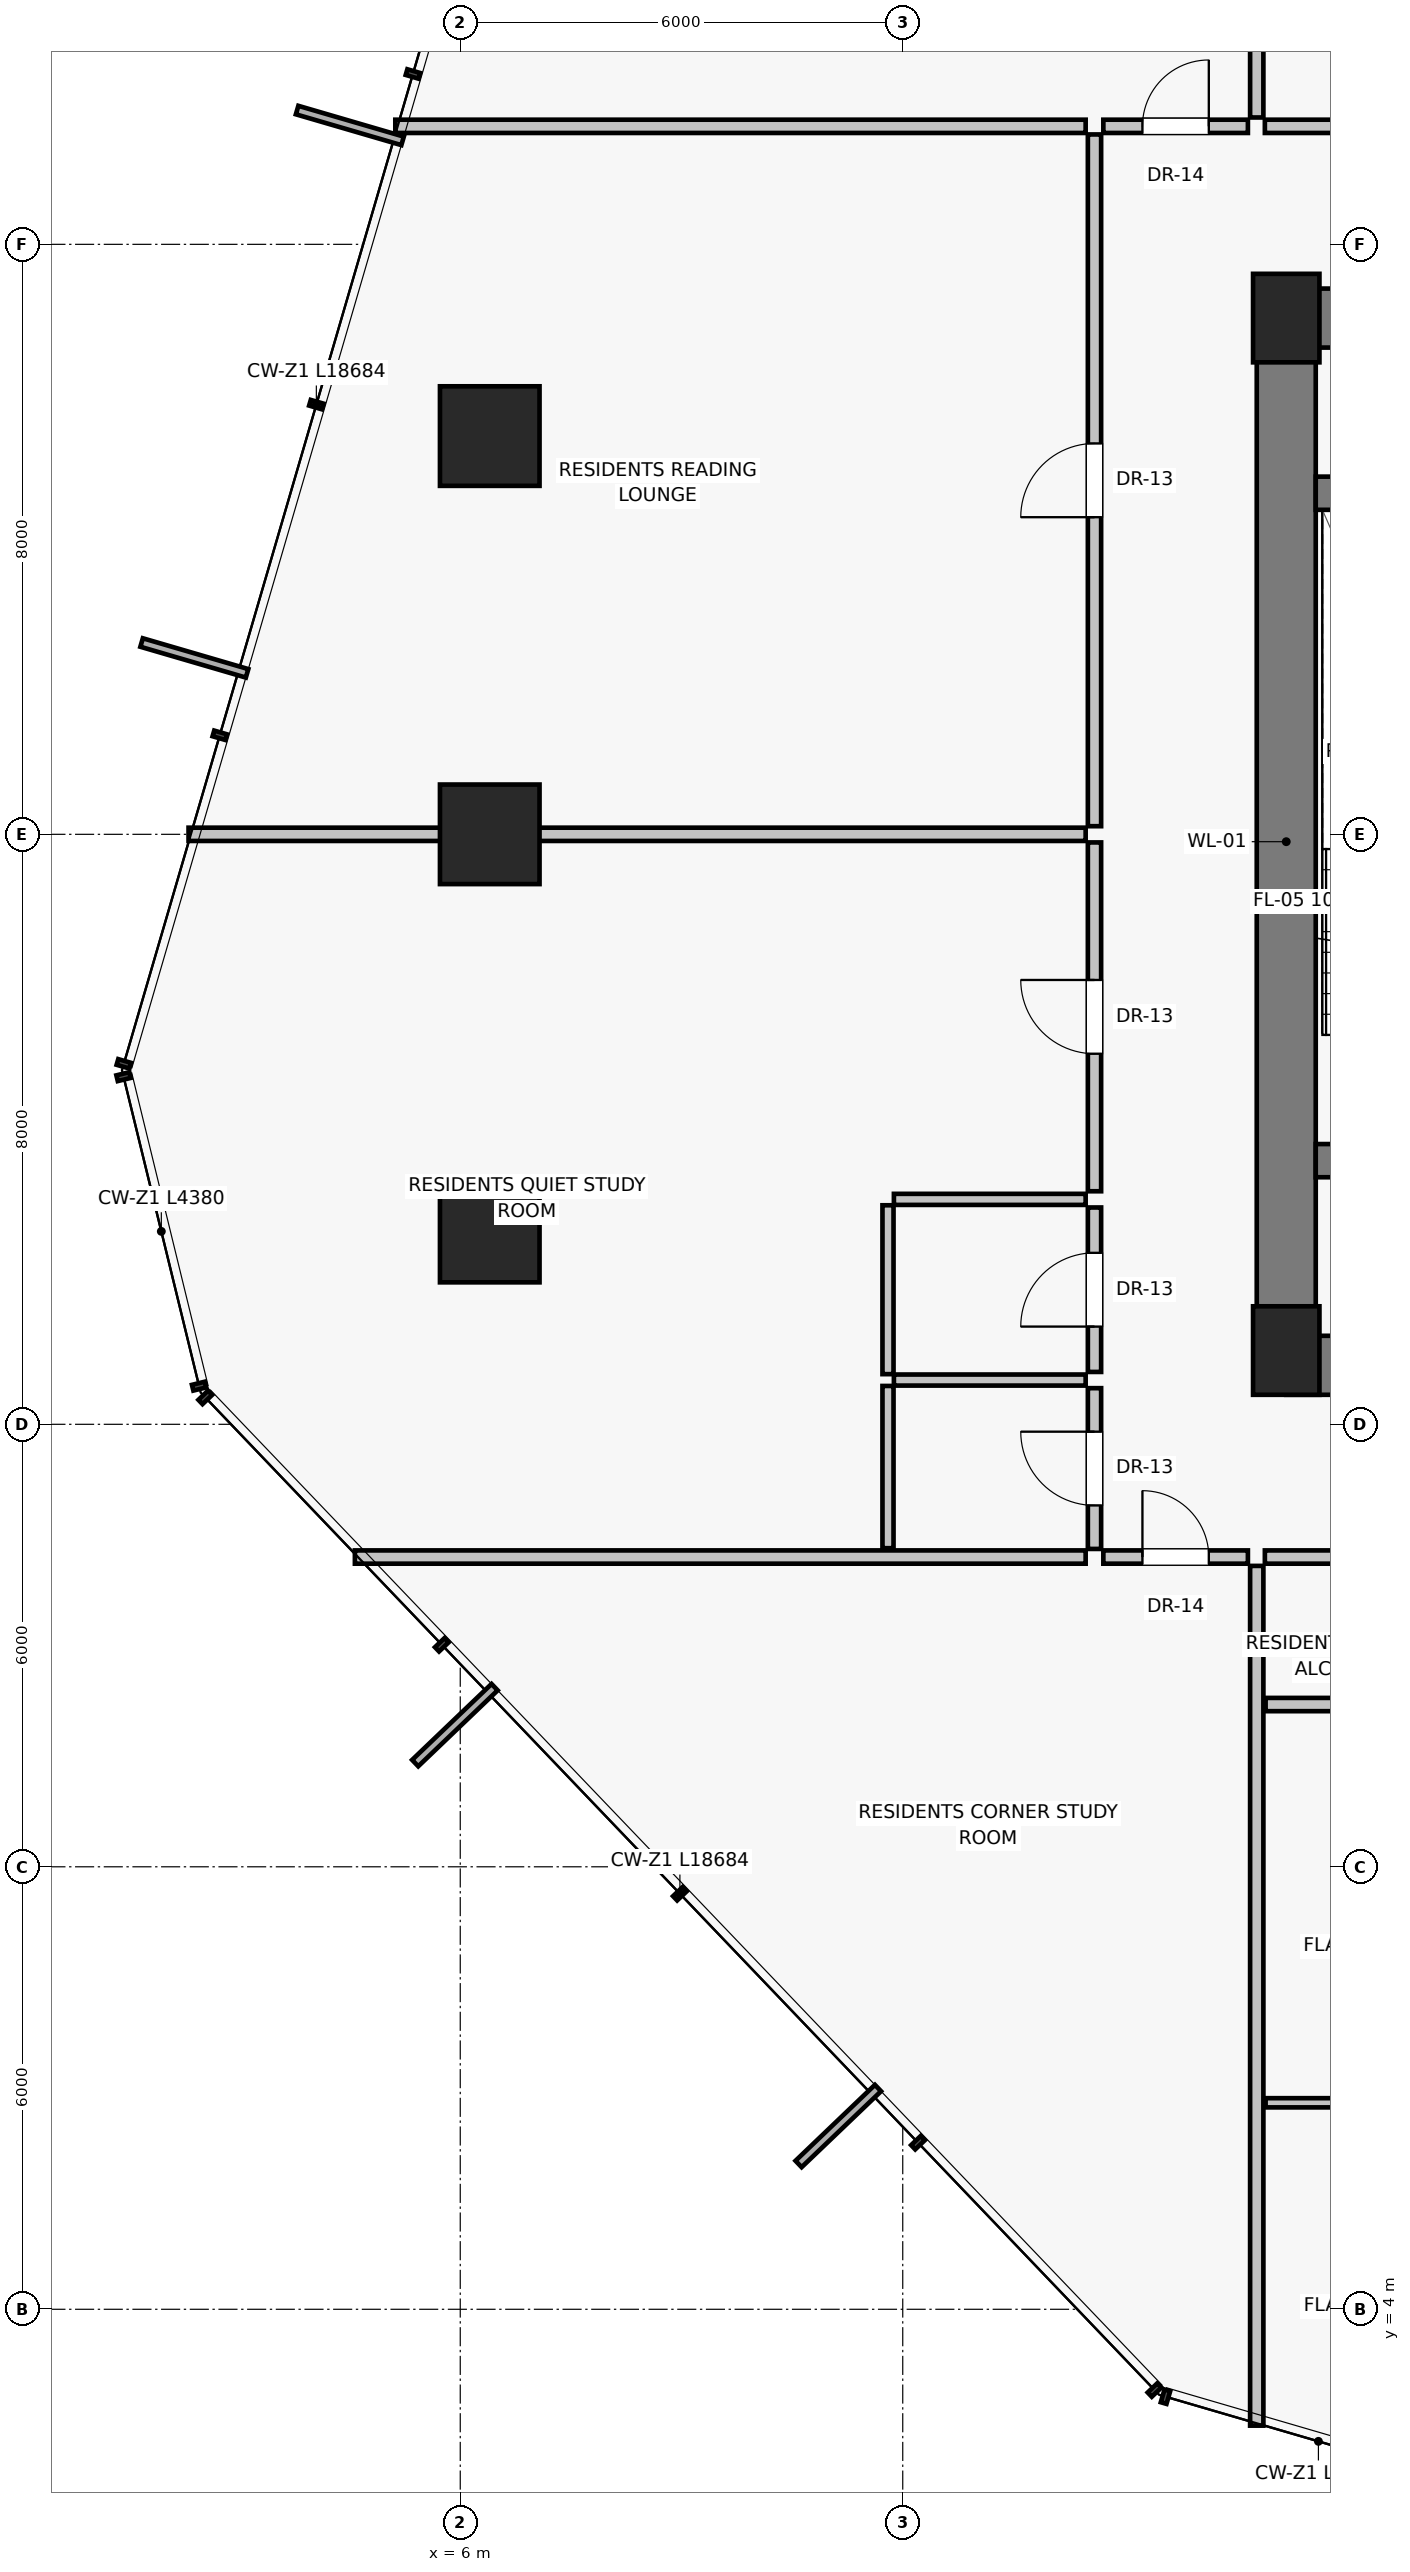
"""IFC4 building model, lengths in metres.
Left out: names, types, materials, properties, quantities, classifications, styles, units other than length and angle.
Written with IfcOpenShell. Run it as: python <this file> out.ifc"""

import sys

from ifc_helpers import new_model, si_unit, direction, frame, frame_2d, origin, origin_2d, place, context, subcontext, project, spatial, rectangle, extrude, source, transform, mapped, element, fill, save


model = new_model("IFC4")
c1 = context("Model", 3, precision=1e-05, world=origin(), true_north=direction((0.0, 1.0)))
c2 = subcontext(c1, "Body", "Model", "MODEL_VIEW")
j1 = project(units=[si_unit("LENGTHUNIT", "METRE"), si_unit("PLANEANGLEUNIT", "RADIAN")], contexts=[c1])
p1 = place(None, origin())
s1 = spatial("IfcSite", under=j1, at=p1, CompositionType="ELEMENT")
p2 = place(p1, origin())
s2 = spatial("IfcBuilding", under=s1, at=p2, CompositionType="ELEMENT")
p3 = place(p2, frame((0.0, 0.0, 70.6)))
s3 = spatial("IfcBuildingStorey", under=s2, at=p3, CompositionType="ELEMENT", Elevation=70.6)
for number, where, z_axis, x_axis in (
    (1, (17.2, 17.0, 0.0), (0.0, 0.0, 1.0), (1.0, 0.0, 0.0)),
    (2, (17.2, 31.0, 0.0), (0.0, 0.0, 1.0), (1.0, 0.0, 0.0)),
):
    element("IfcColumn", number, at=place(p3, frame(where, z_axis=z_axis, x_axis=x_axis)), inside=s3, PredefinedType="PILASTER", context=c2, shape_type="SweptSolid", body=[
        extrude(rectangle(XDim=0.9, YDim=1.2, at=origin_2d()), origin(), (0.0, 0.0, 1.0), 3.25),
    ])
for number, where, z_axis, x_axis in (
    (3, (6.4, 29.4, 0.0), (0.0, 0.0, 1.0), (1.0, 0.0, 0.0)),
    (4, (6.4, 24.0, 0.0), (0.0, 0.0, 1.0), (1.0, 0.0, 0.0)),
    (5, (6.4, 18.6, 0.0), (0.0, 0.0, 1.0), (1.0, 0.0, 0.0)),
):
    element("IfcColumn", number, at=place(p3, frame(where, z_axis=z_axis, x_axis=x_axis)), inside=s3, PredefinedType="COLUMN", context=c2, shape_type="SweptSolid", body=[
        extrude(rectangle(XDim=1.35, YDim=1.35, at=origin_2d()), origin(), (0.0, 0.0, 1.0), 3.25),
    ])
p4 = place(p3, frame((17.2, 16.8, 0.0), z_axis=(0.0, 0.0, 1.0), x_axis=(0.0, 1.0, 0.0)))
e6 = element("IfcWall", 6, at=p4, inside=s3, PredefinedType="SHEAR", context=c2, shape_type="SweptSolid", body=[
    extrude(rectangle(XDim=14.2, YDim=0.8, at=frame_2d((7.1, 0.0))), origin(), (0.0, 0.0, 1.0), 3.0),
])
p5 = place(p3, frame((17.2, 16.8, 0.0), z_axis=(0.0, 0.0, 1.0), x_axis=(1.0, 0.0, 0.0)))
e7 = element("IfcWall", 7, at=p5, inside=s3, PredefinedType="SHEAR", context=c2, shape_type="SweptSolid", body=[
    extrude(rectangle(XDim=5.85, YDim=0.8, at=frame_2d((2.925, 0.0))), origin(), (0.0, 0.0, 1.0), 3.0),
])
p6 = place(p5, frame((1.15, 0.0, 0.0)))
e8 = element("IfcOpeningElement", 8, at=p6, cuts=e7, PredefinedType="OPENING", context=c2, shape_type="SweptSolid", body=[
    extrude(rectangle(XDim=1.2, YDim=2.03, at=frame_2d((0.6, 1.015))), frame((0.0, 0.41, 0.0), z_axis=(0.0, -1.0, 0.0), x_axis=(1.0, 0.0, 0.0)), (0.0, 0.0, 1.0), 0.82),
])
p7 = place(p3, frame((17.2, 31.0, 0.0), z_axis=(0.0, 0.0, 1.0), x_axis=(1.0, 0.0, 0.0)))
e9 = element("IfcWall", 9, at=p7, inside=s3, PredefinedType="SHEAR", context=c2, shape_type="SweptSolid", body=[
    extrude(rectangle(XDim=3.8, YDim=0.8, at=frame_2d((1.9, 0.0))), origin(), (0.0, 0.0, 1.0), 3.0),
])
p8 = place(p7, frame((1.25, 0.0, 0.0)))
e10 = element("IfcOpeningElement", 10, at=p8, cuts=e9, PredefinedType="OPENING", context=c2, shape_type="SweptSolid", body=[
    extrude(rectangle(XDim=0.86, YDim=2.01, at=frame_2d((0.43, 1.005))), frame((0.0, 0.41, 0.0), z_axis=(0.0, -1.0, 0.0), x_axis=(1.0, 0.0, 0.0)), (0.0, 0.0, 1.0), 0.82),
])
p9 = place(p3, frame((17.6, 19.575, 0.0), z_axis=(0.0, 0.0, 1.0), x_axis=(1.0, 0.0, 0.0)))
e11 = element("IfcWall", 11, at=p9, inside=s3, PredefinedType="SHEAR", context=c2, shape_type="SweptSolid", body=[
    extrude(rectangle(XDim=3.425, YDim=0.45, at=frame_2d((1.712, 0.0))), origin(), (0.0, 0.0, 1.0), 3.0),
])
p10 = place(p9, frame((1.05, 0.0, 0.0)))
e12 = element("IfcOpeningElement", 12, at=p10, cuts=e11, PredefinedType="OPENING", context=c2, shape_type="SweptSolid", body=[
    extrude(rectangle(XDim=1.1, YDim=2.03, at=frame_2d((0.55, 1.015))), frame((0.0, 0.235, 0.0), z_axis=(0.0, -1.0, 0.0), x_axis=(1.0, 0.0, 0.0)), (0.0, 0.0, 1.0), 0.47),
])
p11 = place(p3, frame((17.6, 28.625, 0.0), z_axis=(0.0, 0.0, 1.0), x_axis=(1.0, 0.0, 0.0)))
e13 = element("IfcWall", 13, at=p11, inside=s3, PredefinedType="SHEAR", context=c2, shape_type="SweptSolid", body=[
    extrude(rectangle(XDim=3.425, YDim=0.45, at=frame_2d((1.712, 0.0))), origin(), (0.0, 0.0, 1.0), 3.0),
])
p12 = place(p3, frame((16.8, 14.08, 0.0), z_axis=(0.0, 0.0, 1.0), x_axis=(0.0, -1.0, 0.0)))
e14 = element("IfcWall", 14, at=p12, inside=s3, PredefinedType="PARTITIONING", context=c2, shape_type="SweptSolid", body=[
    extrude(rectangle(XDim=11.658, YDim=0.18, at=frame_2d((5.829, 0.0))), origin(), (0.0, 0.0, 1.0), 3.0),
])
p13 = place(p3, frame((16.91, 14.2, 0.0), z_axis=(0.0, 0.0, 1.0), x_axis=(1.0, 0.0, 0.0)))
e15 = element("IfcWall", 15, at=p13, inside=s3, PredefinedType="PARTITIONING", context=c2, shape_type="SweptSolid", body=[
    extrude(rectangle(XDim=4.1, YDim=0.18, at=frame_2d((2.05, 0.0))), origin(), (0.0, 0.0, 1.0), 3.0),
])
p14 = place(p13, frame((1.55, 0.0, 0.0)))
e16 = element("IfcOpeningElement", 16, at=p14, cuts=e15, PredefinedType="OPENING", context=c2, shape_type="SweptSolid", body=[
    extrude(rectangle(XDim=1.0, YDim=2.01, at=frame_2d((0.5, 1.005))), frame((0.0, 0.1, 0.0), z_axis=(0.0, -1.0, 0.0), x_axis=(1.0, 0.0, 0.0)), (0.0, 0.0, 1.0), 0.2),
])
p15 = place(p3, frame((16.92, 6.8, 0.0), z_axis=(0.0, 0.0, 1.0), x_axis=(1.0, 0.0, 0.0)))
e17 = element("IfcWall", 17, at=p15, inside=s3, PredefinedType="PARTITIONING", context=c2, shape_type="SweptSolid", body=[
    extrude(rectangle(XDim=4.1, YDim=0.125, at=frame_2d((2.05, 0.0))), origin(), (0.0, 0.0, 1.0), 2.1),
])
p16 = place(p3, frame((16.92, 12.2, 0.0), z_axis=(0.0, 0.0, 1.0), x_axis=(1.0, 0.0, 0.0)))
e18 = element("IfcWall", 18, at=p16, inside=s3, PredefinedType="PARTITIONING", context=c2, shape_type="SweptSolid", body=[
    extrude(rectangle(XDim=4.1, YDim=0.18, at=frame_2d((2.05, 0.0))), origin(), (0.0, 0.0, 1.0), 3.0),
])
p17 = place(p3, frame((16.8, 33.72, 0.0), z_axis=(0.0, 0.0, 1.0), x_axis=(0.0, 1.0, 0.0)))
e19 = element("IfcWall", 19, at=p17, inside=s3, PredefinedType="PARTITIONING", context=c2, shape_type="SweptSolid", body=[
    extrude(rectangle(XDim=9.948, YDim=0.18, at=frame_2d((4.974, 0.0))), origin(), (0.0, 0.0, 1.0), 3.0),
])
p18 = place(p3, frame((16.91, 33.6, 0.0), z_axis=(0.0, 0.0, 1.0), x_axis=(1.0, 0.0, 0.0)))
e20 = element("IfcWall", 20, at=p18, inside=s3, PredefinedType="PARTITIONING", context=c2, shape_type="SweptSolid", body=[
    extrude(rectangle(XDim=4.1, YDim=0.18, at=frame_2d((2.05, 0.0))), origin(), (0.0, 0.0, 1.0), 3.0),
])
p19 = place(p18, frame((1.55, 0.0, 0.0)))
e21 = element("IfcOpeningElement", 21, at=p19, cuts=e20, PredefinedType="OPENING", context=c2, shape_type="SweptSolid", body=[
    extrude(rectangle(XDim=1.0, YDim=2.01, at=frame_2d((0.5, 1.005))), frame((0.0, 0.1, 0.0), z_axis=(0.0, -1.0, 0.0), x_axis=(1.0, 0.0, 0.0)), (0.0, 0.0, 1.0), 0.2),
])
p20 = place(p3, frame((14.48, 14.2, 0.0), z_axis=(0.0, 0.0, 1.0), x_axis=(-1.0, 0.0, 0.0)))
e22 = element("IfcWall", 22, at=p20, inside=s3, PredefinedType="PARTITIONING", context=c2, shape_type="SweptSolid", body=[
    extrude(rectangle(XDim=9.909, YDim=0.18, at=frame_2d((4.954, 0.0))), origin(), (0.0, 0.0, 1.0), 3.0),
])
p21 = place(p3, frame((14.48, 33.6, 0.0), z_axis=(0.0, 0.0, 1.0), x_axis=(-1.0, 0.0, 0.0)))
e23 = element("IfcWall", 23, at=p21, inside=s3, PredefinedType="PARTITIONING", context=c2, shape_type="SweptSolid", body=[
    extrude(rectangle(XDim=9.361, YDim=0.18, at=frame_2d((4.68, 0.0))), origin(), (0.0, 0.0, 1.0), 3.0),
])
p22 = place(p3, frame((14.6, 14.31, 0.0), z_axis=(0.0, 0.0, 1.0), x_axis=(0.0, 1.0, 0.0)))
e24 = element("IfcWall", 24, at=p22, inside=s3, PredefinedType="PARTITIONING", context=c2, shape_type="SweptSolid", body=[
    extrude(rectangle(XDim=2.18, YDim=0.18, at=frame_2d((1.09, 0.0))), origin(), (0.0, 0.0, 1.0), 3.0),
])
p23 = place(p22, frame((0.59, 0.0, 0.0)))
e25 = element("IfcOpeningElement", 25, at=p23, cuts=e24, PredefinedType="OPENING", context=c2, shape_type="SweptSolid", body=[
    extrude(rectangle(XDim=1.0, YDim=2.01, at=frame_2d((0.5, 1.005))), frame((0.0, 0.1, 0.0), z_axis=(0.0, -1.0, 0.0), x_axis=(1.0, 0.0, 0.0)), (0.0, 0.0, 1.0), 0.2),
])
p24 = place(p3, frame((14.6, 16.71, 0.0), z_axis=(0.0, 0.0, 1.0), x_axis=(0.0, 1.0, 0.0)))
e26 = element("IfcWall", 26, at=p24, inside=s3, PredefinedType="PARTITIONING", context=c2, shape_type="SweptSolid", body=[
    extrude(rectangle(XDim=2.23, YDim=0.18, at=frame_2d((1.115, 0.0))), origin(), (0.0, 0.0, 1.0), 3.0),
])
p25 = place(p24, frame((0.615, 0.0, 0.0)))
e27 = element("IfcOpeningElement", 27, at=p25, cuts=e26, PredefinedType="OPENING", context=c2, shape_type="SweptSolid", body=[
    extrude(rectangle(XDim=1.0, YDim=2.01, at=frame_2d((0.5, 1.005))), frame((0.0, 0.1, 0.0), z_axis=(0.0, -1.0, 0.0), x_axis=(1.0, 0.0, 0.0)), (0.0, 0.0, 1.0), 0.2),
])
p26 = place(p3, frame((14.6, 19.16, 0.0), z_axis=(0.0, 0.0, 1.0), x_axis=(0.0, 1.0, 0.0)))
e28 = element("IfcWall", 28, at=p26, inside=s3, PredefinedType="PARTITIONING", context=c2, shape_type="SweptSolid", body=[
    extrude(rectangle(XDim=4.73, YDim=0.18, at=frame_2d((2.365, 0.0))), origin(), (0.0, 0.0, 1.0), 3.0),
])
p27 = place(p26, frame((1.865, 0.0, 0.0)))
e29 = element("IfcOpeningElement", 29, at=p27, cuts=e28, PredefinedType="OPENING", context=c2, shape_type="SweptSolid", body=[
    extrude(rectangle(XDim=1.0, YDim=2.01, at=frame_2d((0.5, 1.005))), frame((0.0, 0.1, 0.0), z_axis=(0.0, -1.0, 0.0), x_axis=(1.0, 0.0, 0.0)), (0.0, 0.0, 1.0), 0.2),
])
p28 = place(p3, frame((14.6, 24.11, 0.0), z_axis=(0.0, 0.0, 1.0), x_axis=(0.0, 1.0, 0.0)))
e30 = element("IfcWall", 30, at=p28, inside=s3, PredefinedType="PARTITIONING", context=c2, shape_type="SweptSolid", body=[
    extrude(rectangle(XDim=9.38, YDim=0.18, at=frame_2d((4.69, 0.0))), origin(), (0.0, 0.0, 1.0), 3.0),
])
p29 = place(p28, frame((4.19, 0.0, 0.0)))
e31 = element("IfcOpeningElement", 31, at=p29, cuts=e30, PredefinedType="OPENING", context=c2, shape_type="SweptSolid", body=[
    extrude(rectangle(XDim=1.0, YDim=2.01, at=frame_2d((0.5, 1.005))), frame((0.0, 0.1, 0.0), z_axis=(0.0, -1.0, 0.0), x_axis=(1.0, 0.0, 0.0)), (0.0, 0.0, 1.0), 0.2),
])
for number, where, z_axis, x_axis in (
    (32, (14.48, 16.6, 0.0), (0.0, 0.0, 1.0), (-1.0, 0.0, 0.0)),
    (33, (14.48, 19.05, 0.0), (0.0, 0.0, 1.0), (-1.0, 0.0, 0.0)),
):
    element("IfcWall", number, at=place(p3, frame(where, z_axis=z_axis, x_axis=x_axis)), inside=s3, PredefinedType="PARTITIONING", context=c2, shape_type="SweptSolid", body=[
        extrude(rectangle(XDim=2.6, YDim=0.15, at=frame_2d((1.3, 0.0))), origin(), (0.0, 0.0, 1.0), 3.0),
    ])
p30 = place(p3, frame((11.8, 14.32, 0.0), z_axis=(0.0, 0.0, 1.0), x_axis=(0.0, 1.0, 0.0)))
e34 = element("IfcWall", 34, at=p30, inside=s3, PredefinedType="PARTITIONING", context=c2, shape_type="SweptSolid", body=[
    extrude(rectangle(XDim=2.2, YDim=0.15, at=frame_2d((1.1, 0.0))), origin(), (0.0, 0.0, 1.0), 3.0),
])
p31 = place(p3, frame((11.8, 16.68, 0.0), z_axis=(0.0, 0.0, 1.0), x_axis=(0.0, 1.0, 0.0)))
e35 = element("IfcWall", 35, at=p31, inside=s3, PredefinedType="PARTITIONING", context=c2, shape_type="SweptSolid", body=[
    extrude(rectangle(XDim=2.29, YDim=0.15, at=frame_2d((1.145, 0.0))), origin(), (0.0, 0.0, 1.0), 2.58),
])
p32 = place(p3, frame((14.48, 24.0, 0.0), z_axis=(0.0, 0.0, 1.0), x_axis=(-1.0, 0.0, 0.0)))
e36 = element("IfcWall", 36, at=p32, inside=s3, PredefinedType="PARTITIONING", context=c2, shape_type="SweptSolid", body=[
    extrude(rectangle(XDim=12.164, YDim=0.18, at=frame_2d((6.082, 0.0))), origin(), (0.0, 0.0, 1.0), 3.0),
])
p33 = place(p3, frame((14.72, 14.2, 0.0), z_axis=(0.0, 0.0, 1.0), x_axis=(1.0, 0.0, 0.0)))
e37 = element("IfcWall", 37, at=p33, inside=s3, PredefinedType="PARTITIONING", context=c2, shape_type="SweptSolid", body=[
    extrude(rectangle(XDim=1.96, YDim=0.18, at=frame_2d((0.98, 0.0))), origin(), (0.0, 0.0, 1.0), 3.0),
])
p34 = place(p33, frame((0.53, 0.0, 0.0)))
e38 = element("IfcOpeningElement", 38, at=p34, cuts=e37, PredefinedType="OPENING", context=c2, shape_type="SweptSolid", body=[
    extrude(rectangle(XDim=0.9, YDim=2.01, at=frame_2d((0.45, 1.005))), frame((0.0, 0.1, 0.0), z_axis=(0.0, -1.0, 0.0), x_axis=(1.0, 0.0, 0.0)), (0.0, 0.0, 1.0), 0.2),
])
p35 = place(p3, frame((14.72, 33.6, 0.0), z_axis=(0.0, 0.0, 1.0), x_axis=(1.0, 0.0, 0.0)))
e39 = element("IfcWall", 39, at=p35, inside=s3, PredefinedType="PARTITIONING", context=c2, shape_type="SweptSolid", body=[
    extrude(rectangle(XDim=1.96, YDim=0.18, at=frame_2d((0.98, 0.0))), origin(), (0.0, 0.0, 1.0), 3.0),
])
p36 = place(p35, frame((0.53, 0.0, 0.0)))
e40 = element("IfcOpeningElement", 40, at=p36, cuts=e39, PredefinedType="OPENING", context=c2, shape_type="SweptSolid", body=[
    extrude(rectangle(XDim=0.9, YDim=2.01, at=frame_2d((0.45, 1.005))), frame((0.0, 0.1, 0.0), z_axis=(0.0, -1.0, 0.0), x_axis=(1.0, 0.0, 0.0)), (0.0, 0.0, 1.0), 0.2),
])
m1 = source(origin(), c2, "Body", "SweptSolid", [
    extrude(rectangle(XDim=1.0, YDim=2.01, at=frame_2d((0.5, 1.005))), frame((0.0, 0.025, 0.0), z_axis=(0.0, -1.0, 0.0), x_axis=(1.0, 0.0, 0.0)), (0.0, 0.0, 1.0), 0.05),
])
p37 = place(p23, origin())
e41 = element("IfcDoor", 41, at=p37, inside=s3, OperationType="SINGLE_SWING_RIGHT", PredefinedType="DOOR", context=c2, shape_type="MappedRepresentation", body=[
    mapped(m1, transform((0.0, 0.0, 0.0), scale=1.0)),
])
fill(e25, e41)
p38 = place(p25, origin())
e42 = element("IfcDoor", 42, at=p38, inside=s3, OperationType="SINGLE_SWING_LEFT", PredefinedType="DOOR", context=c2, shape_type="MappedRepresentation", body=[
    mapped(m1, transform((0.0, 0.0, 0.0), scale=1.0)),
])
fill(e27, e42)
p39 = place(p27, origin())
e43 = element("IfcDoor", 43, at=p39, inside=s3, OperationType="SINGLE_SWING_RIGHT", PredefinedType="DOOR", context=c2, shape_type="MappedRepresentation", body=[
    mapped(m1, transform((0.0, 0.0, 0.0), scale=1.0)),
])
fill(e29, e43)
p40 = place(p29, origin())
e44 = element("IfcDoor", 44, at=p40, inside=s3, OperationType="SINGLE_SWING_LEFT", PredefinedType="DOOR", context=c2, shape_type="MappedRepresentation", body=[
    mapped(m1, transform((0.0, 0.0, 0.0), scale=1.0)),
])
fill(e31, e44)
m2 = source(origin(), c2, "Body", "SweptSolid", [
    extrude(rectangle(XDim=0.9, YDim=2.01, at=frame_2d((0.45, 1.005))), frame((0.0, 0.025, 0.0), z_axis=(0.0, -1.0, 0.0), x_axis=(1.0, 0.0, 0.0)), (0.0, 0.0, 1.0), 0.05),
])
p41 = place(p34, origin())
e45 = element("IfcDoor", 45, at=p41, inside=s3, OperationType="SINGLE_SWING_LEFT", PredefinedType="DOOR", context=c2, shape_type="MappedRepresentation", body=[
    mapped(m2, transform((0.0, 0.0, 0.0), scale=1.0)),
])
fill(e38, e45)
p42 = place(p36, origin())
e46 = element("IfcDoor", 46, at=p42, inside=s3, OperationType="SINGLE_SWING_RIGHT", PredefinedType="DOOR", context=c2, shape_type="MappedRepresentation", body=[
    mapped(m2, transform((0.0, 0.0, 0.0), scale=1.0)),
])
fill(e40, e46)
save(model, sys.argv[1])
